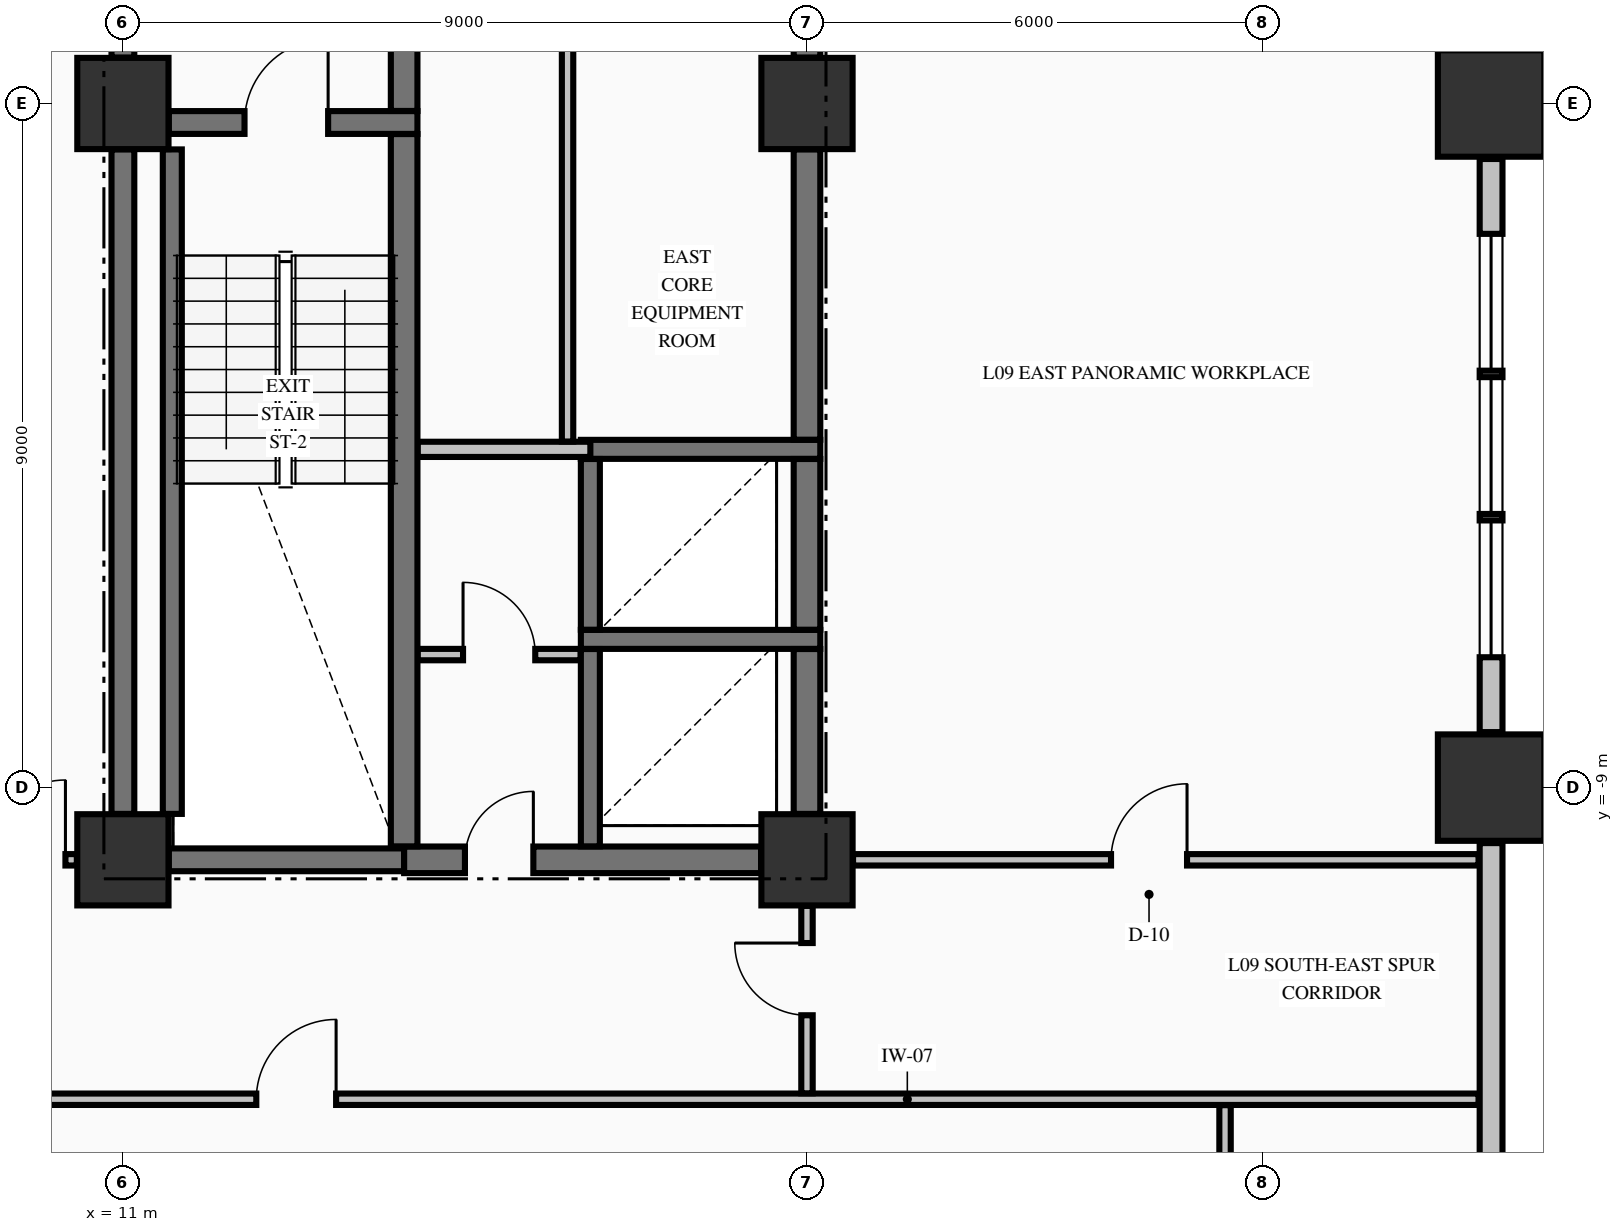
"""IFC4 building model, lengths in metres.
Left out: names, types, materials, properties, quantities, classifications, styles, units other than length and angle.
Written with IfcOpenShell. Run it as: python <this file> out.ifc"""

import sys

from ifc_helpers import new_model, si_unit, direction, frame, frame_2d, origin, origin_2d, place, context, subcontext, project, spatial, rectangle, extrude, element, fill, save


model = new_model("IFC4")
c1 = context("Model", 3, precision=1e-05, world=origin(), true_north=direction((0.0, 1.0)))
c2 = subcontext(c1, "Body", "Model", "MODEL_VIEW")
j1 = project(units=[si_unit("LENGTHUNIT", "METRE"), si_unit("PLANEANGLEUNIT", "RADIAN")], contexts=[c1])
p1 = place(None, origin())
s1 = spatial("IfcSite", under=j1, at=p1, CompositionType="ELEMENT")
p2 = place(p1, origin())
s2 = spatial("IfcBuilding", under=s1, at=p2, CompositionType="ELEMENT")
p3 = place(p2, frame((0.0, 0.0, 41.48)))
s3 = spatial("IfcBuildingStorey", under=s2, at=p3, CompositionType="ELEMENT", Elevation=41.48)
for number, where, z_axis, x_axis in (
    (1, (29.0, -9.0, -0.25), (0.0, 0.0, 1.0), (1.0, 0.0, 0.0)),
    (2, (29.0, 0.0, -0.25), (0.0, 0.0, 1.0), (1.0, 0.0, 0.0)),
):
    element("IfcColumn", number, at=place(p3, frame(where, z_axis=z_axis, x_axis=x_axis)), inside=s3, PredefinedType="COLUMN", context=c2, shape_type="SweptSolid", body=[
        extrude(rectangle(XDim=1.4, YDim=1.4, at=origin_2d()), origin(), (0.0, 0.0, 1.0), 3.57),
    ])
for number, where, z_axis, x_axis in (
    (3, (11.0, -9.95, -0.25), (0.0, 0.0, 1.0), (1.0, 0.0, 0.0)),
    (4, (11.0, 0.0, -0.25), (0.0, 0.0, 1.0), (1.0, 0.0, 0.0)),
    (5, (20.0, -9.95, -0.25), (0.0, 0.0, 1.0), (1.0, 0.0, 0.0)),
    (6, (20.0, 0.0, -0.25), (0.0, 0.0, 1.0), (1.0, 0.0, 0.0)),
):
    element("IfcColumn", number, at=place(p3, frame(where, z_axis=z_axis, x_axis=x_axis)), inside=s3, PredefinedType="COLUMN", context=c2, shape_type="SweptSolid", body=[
        extrude(rectangle(XDim=1.2, YDim=1.2, at=origin_2d()), origin(), (0.0, 0.0, 1.0), 3.57),
    ])
p4 = place(p3, frame((29.0, -22.27, 0.0), z_axis=(0.0, 0.0, 1.0), x_axis=(0.0, 1.0, 0.0)))
e7 = element("IfcWall", 7, at=p4, inside=s3, PredefinedType="STANDARD", context=c2, shape_type="SweptSolid", body=[
    extrude(rectangle(XDim=12.54, YDim=0.3, at=frame_2d((6.27, 0.0))), origin(), (0.0, 0.0, 1.0), 2.712),
])
p5 = place(p3, frame((29.0, -8.27, 0.0), z_axis=(0.0, 0.0, 1.0), x_axis=(0.0, 1.0, 0.0)))
e8 = element("IfcWall", 8, at=p5, inside=s3, PredefinedType="STANDARD", context=c2, shape_type="SweptSolid", body=[
    extrude(rectangle(XDim=7.54, YDim=0.3, at=frame_2d((3.77, 0.0))), origin(), (0.0, 0.0, 1.0), 2.712),
])
p6 = place(p5, frame((0.985, 0.0, 0.78)))
e9 = element("IfcOpeningElement", 9, at=p6, cuts=e8, PredefinedType="OPENING", context=c2, shape_type="SweptSolid", body=[
    extrude(rectangle(XDim=1.8, YDim=1.72, at=frame_2d((0.9, 0.86))), frame((0.0, 0.16, 0.0), z_axis=(0.0, -1.0, 0.0), x_axis=(1.0, 0.0, 0.0)), (0.0, 0.0, 1.0), 0.32),
])
p7 = place(p5, frame((2.87, 0.0, 0.78)))
e10 = element("IfcOpeningElement", 10, at=p7, cuts=e8, PredefinedType="OPENING", context=c2, shape_type="SweptSolid", body=[
    extrude(rectangle(XDim=1.8, YDim=1.72, at=frame_2d((0.9, 0.86))), frame((0.0, 0.16, 0.0), z_axis=(0.0, -1.0, 0.0), x_axis=(1.0, 0.0, 0.0)), (0.0, 0.0, 1.0), 0.32),
])
p8 = place(p5, frame((4.755, 0.0, 0.78)))
e11 = element("IfcOpeningElement", 11, at=p8, cuts=e8, PredefinedType="OPENING", context=c2, shape_type="SweptSolid", body=[
    extrude(rectangle(XDim=1.8, YDim=1.72, at=frame_2d((0.9, 0.86))), frame((0.0, 0.16, 0.0), z_axis=(0.0, -1.0, 0.0), x_axis=(1.0, 0.0, 0.0)), (0.0, 0.0, 1.0), 0.32),
])
p9 = place(p3, frame((11.604, -9.95, 0.0), z_axis=(0.0, 0.0, 1.0), x_axis=(1.0, 0.0, 0.0)))
e12 = element("IfcWall", 12, at=p9, inside=s3, PredefinedType="SHEAR", context=c2, shape_type="SweptSolid", body=[
    extrude(rectangle(XDim=3.096, YDim=0.3, at=frame_2d((1.548, 0.0))), origin(), (0.0, 0.0, 1.0), 3.32),
])
p10 = place(p3, frame((14.7, -9.95, 0.0), z_axis=(0.0, 0.0, 1.0), x_axis=(1.0, 0.0, 0.0)))
e13 = element("IfcWall", 13, at=p10, inside=s3, PredefinedType="SHEAR", context=c2, shape_type="SweptSolid", body=[
    extrude(rectangle(XDim=4.696, YDim=0.35, at=frame_2d((2.348, 0.0))), origin(), (0.0, 0.0, 1.0), 3.32),
])
p11 = place(p10, frame((0.8, 0.0, 0.0)))
e14 = element("IfcOpeningElement", 14, at=p11, cuts=e13, PredefinedType="OPENING", context=c2, shape_type="SweptSolid", body=[
    extrude(rectangle(XDim=0.9, YDim=2.15, at=frame_2d((0.45, 1.075))), frame((0.0, 0.185, 0.0), z_axis=(0.0, -1.0, 0.0), x_axis=(1.0, 0.0, 0.0)), (0.0, 0.0, 1.0), 0.37),
])
for number, where, z_axis, x_axis in (
    (15, (17.025, -7.05, 0.0), (0.0, 0.0, 1.0), (1.0, 0.0, 0.0)),
    (16, (17.025, -4.55, 0.0), (0.0, 0.0, 1.0), (1.0, 0.0, 0.0)),
):
    element("IfcWall", number, at=place(p3, frame(where, z_axis=z_axis, x_axis=x_axis)), inside=s3, PredefinedType="SOLIDWALL", context=c2, shape_type="SweptSolid", body=[
        extrude(rectangle(XDim=3.15, YDim=0.25, at=frame_2d((1.575, 0.0))), origin(), (0.0, 0.0, 1.0), 3.32),
    ])
p12 = place(p3, frame((11.604, -0.25, 0.0), z_axis=(0.0, 0.0, 1.0), x_axis=(1.0, 0.0, 0.0)))
e17 = element("IfcWall", 17, at=p12, inside=s3, PredefinedType="SHEAR", context=c2, shape_type="SweptSolid", body=[
    extrude(rectangle(XDim=3.271, YDim=0.3, at=frame_2d((1.635, 0.0))), origin(), (0.0, 0.0, 1.0), 3.32),
])
p13 = place(p12, frame((0.996, 0.0, 0.0)))
e18 = element("IfcOpeningElement", 18, at=p13, cuts=e17, PredefinedType="OPENING", context=c2, shape_type="SweptSolid", body=[
    extrude(rectangle(XDim=1.1, YDim=2.15, at=frame_2d((0.55, 1.075))), frame((0.0, 0.16, 0.0), z_axis=(0.0, -1.0, 0.0), x_axis=(1.0, 0.0, 0.0)), (0.0, 0.0, 1.0), 0.32),
])
p14 = place(p3, frame((-23.835, -13.1, 0.0), z_axis=(0.0, 0.0, 1.0), x_axis=(1.0, 0.0, 0.0)))
e19 = element("IfcWall", 19, at=p14, inside=s3, PredefinedType="PARTITIONING", context=c2, shape_type="SweptSolid", body=[
    extrude(rectangle(XDim=52.67, YDim=0.15, at=frame_2d((26.335, 0.0))), origin(), (0.0, 0.0, 1.0), 3.32),
])
p15 = place(p14, frame((6.99, 0.0, 0.0)))
e20 = element("IfcOpeningElement", 20, at=p15, cuts=e19, PredefinedType="OPENING", context=c2, shape_type="SweptSolid", body=[
    extrude(rectangle(XDim=1.05, YDim=2.15, at=frame_2d((0.525, 1.075))), frame((0.0, 0.085, 0.0), z_axis=(0.0, -1.0, 0.0), x_axis=(1.0, 0.0, 0.0)), (0.0, 0.0, 1.0), 0.17),
])
p16 = place(p14, frame((15.26, 0.0, 0.0)))
e21 = element("IfcOpeningElement", 21, at=p16, cuts=e19, PredefinedType="OPENING", context=c2, shape_type="SweptSolid", body=[
    extrude(rectangle(XDim=1.05, YDim=2.15, at=frame_2d((0.525, 1.075))), frame((0.0, 0.085, 0.0), z_axis=(0.0, -1.0, 0.0), x_axis=(1.0, 0.0, 0.0)), (0.0, 0.0, 1.0), 0.17),
])
p17 = place(p14, frame((25.06, 0.0, 0.0)))
e22 = element("IfcOpeningElement", 22, at=p17, cuts=e19, PredefinedType="OPENING", context=c2, shape_type="SweptSolid", body=[
    extrude(rectangle(XDim=1.05, YDim=2.15, at=frame_2d((0.525, 1.075))), frame((0.0, 0.085, 0.0), z_axis=(0.0, -1.0, 0.0), x_axis=(1.0, 0.0, 0.0)), (0.0, 0.0, 1.0), 0.17),
])
p18 = place(p14, frame((36.59, 0.0, 0.0)))
e23 = element("IfcOpeningElement", 23, at=p18, cuts=e19, PredefinedType="OPENING", context=c2, shape_type="SweptSolid", body=[
    extrude(rectangle(XDim=1.05, YDim=2.15, at=frame_2d((0.525, 1.075))), frame((0.0, 0.085, 0.0), z_axis=(0.0, -1.0, 0.0), x_axis=(1.0, 0.0, 0.0)), (0.0, 0.0, 1.0), 0.17),
])
p19 = place(p3, frame((-10.394, -9.95, 0.0), z_axis=(0.0, 0.0, 1.0), x_axis=(1.0, 0.0, 0.0)))
e24 = element("IfcWall", 24, at=p19, inside=s3, PredefinedType="PARTITIONING", context=c2, shape_type="SweptSolid", body=[
    extrude(rectangle(XDim=20.788, YDim=0.15, at=frame_2d((10.394, 0.0))), origin(), (0.0, 0.0, 1.0), 3.32),
])
p20 = place(p19, frame((0.15, 0.0, 0.0)))
e25 = element("IfcOpeningElement", 25, at=p20, cuts=e24, PredefinedType="OPENING", context=c2, shape_type="SweptSolid", body=[
    extrude(rectangle(XDim=1.05, YDim=2.15, at=frame_2d((0.525, 1.075))), frame((0.0, 0.085, 0.0), z_axis=(0.0, -1.0, 0.0), x_axis=(1.0, 0.0, 0.0)), (0.0, 0.0, 1.0), 0.17),
])
p21 = place(p19, frame((19.588, 0.0, 0.0)))
e26 = element("IfcOpeningElement", 26, at=p21, cuts=e24, PredefinedType="OPENING", context=c2, shape_type="SweptSolid", body=[
    extrude(rectangle(XDim=1.05, YDim=2.15, at=frame_2d((0.525, 1.075))), frame((0.0, 0.085, 0.0), z_axis=(0.0, -1.0, 0.0), x_axis=(1.0, 0.0, 0.0)), (0.0, 0.0, 1.0), 0.17),
])
p22 = place(p19, frame((12.669, 0.0, 0.0)))
e27 = element("IfcOpeningElement", 27, at=p22, cuts=e24, PredefinedType="OPENING", context=c2, shape_type="SweptSolid", body=[
    extrude(rectangle(XDim=0.95, YDim=2.15, at=frame_2d((0.475, 1.075))), frame((0.0, 0.085, 0.0), z_axis=(0.0, -1.0, 0.0), x_axis=(1.0, 0.0, 0.0)), (0.0, 0.0, 1.0), 0.17),
])
p23 = place(p3, frame((20.606, -9.95, 0.0), z_axis=(0.0, 0.0, 1.0), x_axis=(1.0, 0.0, 0.0)))
e28 = element("IfcWall", 28, at=p23, inside=s3, PredefinedType="PARTITIONING", context=c2, shape_type="SweptSolid", body=[
    extrude(rectangle(XDim=8.229, YDim=0.15, at=frame_2d((4.115, 0.0))), origin(), (0.0, 0.0, 1.0), 3.32),
])
p24 = place(p23, frame((3.394, 0.0, 0.0)))
e29 = element("IfcOpeningElement", 29, at=p24, cuts=e28, PredefinedType="OPENING", context=c2, shape_type="SweptSolid", body=[
    extrude(rectangle(XDim=1.0, YDim=2.15, at=frame_2d((0.5, 1.075))), frame((0.0, 0.085, 0.0), z_axis=(0.0, -1.0, 0.0), x_axis=(1.0, 0.0, 0.0)), (0.0, 0.0, 1.0), 0.17),
])
p25 = place(p3, frame((14.878, -7.25, 0.0), z_axis=(0.0, 0.0, 1.0), x_axis=(1.0, 0.0, 0.0)))
e30 = element("IfcWall", 30, at=p25, inside=s3, PredefinedType="PARTITIONING", context=c2, shape_type="SweptSolid", body=[
    extrude(rectangle(XDim=2.144, YDim=0.15, at=frame_2d((1.072, 0.0))), origin(), (0.0, 0.0, 1.0), 3.32),
])
p26 = place(p25, frame((0.597, 0.0, 0.0)))
e31 = element("IfcOpeningElement", 31, at=p26, cuts=e30, PredefinedType="OPENING", context=c2, shape_type="SweptSolid", body=[
    extrude(rectangle(XDim=0.95, YDim=2.15, at=frame_2d((0.475, 1.075))), frame((0.0, 0.085, 0.0), z_axis=(0.0, -1.0, 0.0), x_axis=(1.0, 0.0, 0.0)), (0.0, 0.0, 1.0), 0.17),
])
p27 = place(p3, frame((14.878, -4.55, 0.0), z_axis=(0.0, 0.0, 1.0), x_axis=(1.0, 0.0, 0.0)))
e32 = element("IfcWall", 32, at=p27, inside=s3, PredefinedType="PARTITIONING", context=c2, shape_type="SweptSolid", body=[
    extrude(rectangle(XDim=2.272, YDim=0.2, at=frame_2d((1.136, 0.0))), origin(), (0.0, 0.0, 1.0), 3.32),
])
p28 = place(p3, frame((11.0, -9.346, 0.0), z_axis=(0.0, 0.0, 1.0), x_axis=(0.0, 1.0, 0.0)))
e33 = element("IfcWall", 33, at=p28, inside=s3, PredefinedType="SHEAR", context=c2, shape_type="SweptSolid", body=[
    extrude(rectangle(XDim=8.742, YDim=0.3, at=frame_2d((4.371, 0.0))), origin(), (0.0, 0.0, 1.0), 3.32),
])
p29 = place(p3, frame((11.0, 0.604, 0.0), z_axis=(0.0, 0.0, 1.0), x_axis=(0.0, 1.0, 0.0)))
e34 = element("IfcWall", 34, at=p29, inside=s3, PredefinedType="SHEAR", context=c2, shape_type="SweptSolid", body=[
    extrude(rectangle(XDim=2.144, YDim=0.3, at=frame_2d((1.072, 0.0))), origin(), (0.0, 0.0, 1.0), 3.32),
])
p30 = place(p29, frame((0.496, 0.0, 0.0)))
e35 = element("IfcOpeningElement", 35, at=p30, cuts=e34, PredefinedType="OPENING", context=c2, shape_type="SweptSolid", body=[
    extrude(rectangle(XDim=1.1, YDim=2.15, at=frame_2d((0.55, 1.075))), frame((0.0, 0.16, 0.0), z_axis=(0.0, -1.0, 0.0), x_axis=(1.0, 0.0, 0.0)), (0.0, 0.0, 1.0), 0.32),
])
p31 = place(p3, frame((11.65, -9.346, 0.0), z_axis=(0.0, 0.0, 1.0), x_axis=(0.0, 1.0, 0.0)))
e36 = element("IfcWall", 36, at=p31, inside=s3, PredefinedType="SOLIDWALL", context=c2, shape_type="SweptSolid", body=[
    extrude(rectangle(XDim=8.742, YDim=0.25, at=frame_2d((4.371, 0.0))), origin(), (0.0, 0.0, 1.0), 3.32),
])
p32 = place(p3, frame((14.7, -9.773, 0.0), z_axis=(0.0, 0.0, 1.0), x_axis=(0.0, 1.0, 0.0)))
e37 = element("IfcWall", 37, at=p32, inside=s3, PredefinedType="SHEAR", context=c2, shape_type="SweptSolid", body=[
    extrude(rectangle(XDim=9.371, YDim=0.35, at=frame_2d((4.686, 0.0))), origin(), (0.0, 0.0, 1.0), 3.32),
])
p33 = place(p3, frame((14.7, -0.098, 0.0), z_axis=(0.0, 0.0, 1.0), x_axis=(0.0, 1.0, 0.0)))
e38 = element("IfcWall", 38, at=p33, inside=s3, PredefinedType="SHEAR", context=c2, shape_type="SweptSolid", body=[
    extrude(rectangle(XDim=2.846, YDim=0.35, at=frame_2d((1.423, 0.0))), origin(), (0.0, 0.0, 1.0), 3.32),
])
p34 = place(p3, frame((17.15, -9.773, 0.0), z_axis=(0.0, 0.0, 1.0), x_axis=(0.0, 1.0, 0.0)))
e39 = element("IfcWall", 39, at=p34, inside=s3, PredefinedType="SOLIDWALL", context=c2, shape_type="SweptSolid", body=[
    extrude(rectangle(XDim=2.596, YDim=0.25, at=frame_2d((1.298, 0.0))), origin(), (0.0, 0.0, 1.0), 3.32),
])
p35 = place(p3, frame((17.15, -6.923, 0.0), z_axis=(0.0, 0.0, 1.0), x_axis=(0.0, 1.0, 0.0)))
e40 = element("IfcWall", 40, at=p35, inside=s3, PredefinedType="SOLIDWALL", context=c2, shape_type="SweptSolid", body=[
    extrude(rectangle(XDim=2.246, YDim=0.25, at=frame_2d((1.123, 0.0))), origin(), (0.0, 0.0, 1.0), 3.32),
])
p36 = place(p3, frame((20.0, -9.346, 0.0), z_axis=(0.0, 0.0, 1.0), x_axis=(0.0, 1.0, 0.0)))
e41 = element("IfcWall", 41, at=p36, inside=s3, PredefinedType="SHEAR", context=c2, shape_type="SweptSolid", body=[
    extrude(rectangle(XDim=2.169, YDim=0.35, at=frame_2d((1.084, 0.0))), origin(), (0.0, 0.0, 1.0), 3.32),
])
p37 = place(p3, frame((20.0, -6.923, 0.0), z_axis=(0.0, 0.0, 1.0), x_axis=(0.0, 1.0, 0.0)))
e42 = element("IfcWall", 42, at=p37, inside=s3, PredefinedType="SHEAR", context=c2, shape_type="SweptSolid", body=[
    extrude(rectangle(XDim=2.246, YDim=0.35, at=frame_2d((1.123, 0.0))), origin(), (0.0, 0.0, 1.0), 3.32),
])
p38 = place(p3, frame((20.0, -4.423, 0.0), z_axis=(0.0, 0.0, 1.0), x_axis=(0.0, 1.0, 0.0)))
e43 = element("IfcWall", 43, at=p38, inside=s3, PredefinedType="SHEAR", context=c2, shape_type="SweptSolid", body=[
    extrude(rectangle(XDim=3.819, YDim=0.35, at=frame_2d((1.91, 0.0))), origin(), (0.0, 0.0, 1.0), 3.32),
])
p39 = place(p3, frame((20.0, 0.604, 0.0), z_axis=(0.0, 0.0, 1.0), x_axis=(0.0, 1.0, 0.0)))
e44 = element("IfcWall", 44, at=p39, inside=s3, PredefinedType="SHEAR", context=c2, shape_type="SweptSolid", body=[
    extrude(rectangle(XDim=9.292, YDim=0.35, at=frame_2d((4.646, 0.0))), origin(), (0.0, 0.0, 1.0), 3.32),
])
p40 = place(p3, frame((16.85, -4.447, 0.0), z_axis=(0.0, 0.0, 1.0), x_axis=(0.0, 1.0, 0.0)))
e45 = element("IfcWall", 45, at=p40, inside=s3, PredefinedType="PARTITIONING", context=c2, shape_type="SweptSolid", body=[
    extrude(rectangle(XDim=7.369, YDim=0.15, at=frame_2d((3.685, 0.0))), origin(), (0.0, 0.0, 1.0), 3.32),
])
p41 = place(p3, frame((20.0, -13.022, 0.0), z_axis=(0.0, 0.0, 1.0), x_axis=(0.0, 1.0, 0.0)))
e46 = element("IfcWall", 46, at=p41, inside=s3, PredefinedType="PARTITIONING", context=c2, shape_type="SweptSolid", body=[
    extrude(rectangle(XDim=2.466, YDim=0.15, at=frame_2d((1.233, 0.0))), origin(), (0.0, 0.0, 1.0), 2.66),
])
p42 = place(p41, frame((1.027, 0.0, 0.0)))
e47 = element("IfcOpeningElement", 47, at=p42, cuts=e46, PredefinedType="OPENING", context=c2, shape_type="SweptSolid", body=[
    extrude(rectangle(XDim=0.95, YDim=2.15, at=frame_2d((0.475, 1.075))), frame((0.0, 0.085, 0.0), z_axis=(0.0, -1.0, 0.0), x_axis=(1.0, 0.0, 0.0)), (0.0, 0.0, 1.0), 0.17),
])
p43 = place(p3, frame((25.5, -22.294, 0.0), z_axis=(0.0, 0.0, 1.0), x_axis=(0.0, 1.0, 0.0)))
e48 = element("IfcWall", 48, at=p43, inside=s3, PredefinedType="PARTITIONING", context=c2, shape_type="SweptSolid", body=[
    extrude(rectangle(XDim=9.116, YDim=0.15, at=frame_2d((4.558, 0.0))), origin(), (0.0, 0.0, 1.0), 3.32),
])
p44 = place(p6, origin())
e49 = element("IfcWindow", 49, at=p44, inside=s3, PartitioningType="SINGLE_PANEL", PredefinedType="WINDOW", context=c2, shape_type="SweptSolid", body=[
    extrude(rectangle(XDim=1.8, YDim=1.72, at=frame_2d((0.9, 0.86))), frame((0.0, 0.03, 0.0), z_axis=(0.0, -1.0, 0.0), x_axis=(1.0, 0.0, 0.0)), (0.0, 0.0, 1.0), 0.06),
])
fill(e9, e49)
p45 = place(p7, origin())
e50 = element("IfcWindow", 50, at=p45, inside=s3, PartitioningType="SINGLE_PANEL", PredefinedType="WINDOW", context=c2, shape_type="SweptSolid", body=[
    extrude(rectangle(XDim=1.8, YDim=1.72, at=frame_2d((0.9, 0.86))), frame((0.0, 0.03, 0.0), z_axis=(0.0, -1.0, 0.0), x_axis=(1.0, 0.0, 0.0)), (0.0, 0.0, 1.0), 0.06),
])
fill(e10, e50)
p46 = place(p8, origin())
e51 = element("IfcWindow", 51, at=p46, inside=s3, PartitioningType="SINGLE_PANEL", PredefinedType="WINDOW", context=c2, shape_type="SweptSolid", body=[
    extrude(rectangle(XDim=1.8, YDim=1.72, at=frame_2d((0.9, 0.86))), frame((0.0, 0.03, 0.0), z_axis=(0.0, -1.0, 0.0), x_axis=(1.0, 0.0, 0.0)), (0.0, 0.0, 1.0), 0.06),
])
fill(e11, e51)
p47 = place(p13, origin())
e52 = element("IfcDoor", 52, at=p47, inside=s3, OperationType="SINGLE_SWING_RIGHT", PredefinedType="DOOR", context=c2, shape_type="SweptSolid", body=[
    extrude(rectangle(XDim=1.1, YDim=2.15, at=frame_2d((0.55, 1.075))), frame((0.0, 0.025, 0.0), z_axis=(0.0, -1.0, 0.0), x_axis=(1.0, 0.0, 0.0)), (0.0, 0.0, 1.0), 0.05),
])
fill(e18, e52)
p48 = place(p11, origin())
e53 = element("IfcDoor", 53, at=p48, inside=s3, OperationType="SINGLE_SWING_RIGHT", PredefinedType="DOOR", context=c2, shape_type="SweptSolid", body=[
    extrude(rectangle(XDim=0.9, YDim=2.15, at=frame_2d((0.45, 1.075))), frame((0.0, 0.025, 0.0), z_axis=(0.0, -1.0, 0.0), x_axis=(1.0, 0.0, 0.0)), (0.0, 0.0, 1.0), 0.05),
])
fill(e14, e53)
p49 = place(p26, origin())
e54 = element("IfcDoor", 54, at=p49, inside=s3, OperationType="SINGLE_SWING_LEFT", PredefinedType="DOOR", context=c2, shape_type="SweptSolid", body=[
    extrude(rectangle(XDim=0.95, YDim=2.15, at=frame_2d((0.475, 1.075))), frame((0.0, 0.025, 0.0), z_axis=(0.0, -1.0, 0.0), x_axis=(1.0, 0.0, 0.0)), (0.0, 0.0, 1.0), 0.05),
])
fill(e31, e54)
p50 = place(p21, origin())
e55 = element("IfcDoor", 55, at=p50, inside=s3, OperationType="SINGLE_SWING_RIGHT", PredefinedType="DOOR", context=c2, shape_type="SweptSolid", body=[
    extrude(rectangle(XDim=1.05, YDim=2.15, at=frame_2d((0.525, 1.075))), frame((0.0, 0.025, 0.0), z_axis=(0.0, -1.0, 0.0), x_axis=(1.0, 0.0, 0.0)), (0.0, 0.0, 1.0), 0.05),
])
fill(e26, e55)
p51 = place(p18, origin())
e56 = element("IfcDoor", 56, at=p51, inside=s3, OperationType="SINGLE_SWING_RIGHT", PredefinedType="DOOR", context=c2, shape_type="SweptSolid", body=[
    extrude(rectangle(XDim=1.05, YDim=2.15, at=frame_2d((0.525, 1.075))), frame((0.0, 0.025, 0.0), z_axis=(0.0, -1.0, 0.0), x_axis=(1.0, 0.0, 0.0)), (0.0, 0.0, 1.0), 0.05),
])
fill(e23, e56)
p52 = place(p42, origin())
e57 = element("IfcDoor", 57, at=p52, inside=s3, OperationType="SINGLE_SWING_RIGHT", PredefinedType="DOOR", context=c2, shape_type="SweptSolid", body=[
    extrude(rectangle(XDim=0.95, YDim=2.15, at=frame_2d((0.475, 1.075))), frame((0.0, 0.025, 0.0), z_axis=(0.0, -1.0, 0.0), x_axis=(1.0, 0.0, 0.0)), (0.0, 0.0, 1.0), 0.05),
])
fill(e47, e57)
p53 = place(p24, origin())
e58 = element("IfcDoor", 58, at=p53, inside=s3, OperationType="SINGLE_SWING_RIGHT", PredefinedType="DOOR", context=c2, shape_type="SweptSolid", body=[
    extrude(rectangle(XDim=1.0, YDim=2.15, at=frame_2d((0.5, 1.075))), frame((0.0, 0.025, 0.0), z_axis=(0.0, -1.0, 0.0), x_axis=(1.0, 0.0, 0.0)), (0.0, 0.0, 1.0), 0.05),
])
fill(e29, e58)
save(model, sys.argv[1])
